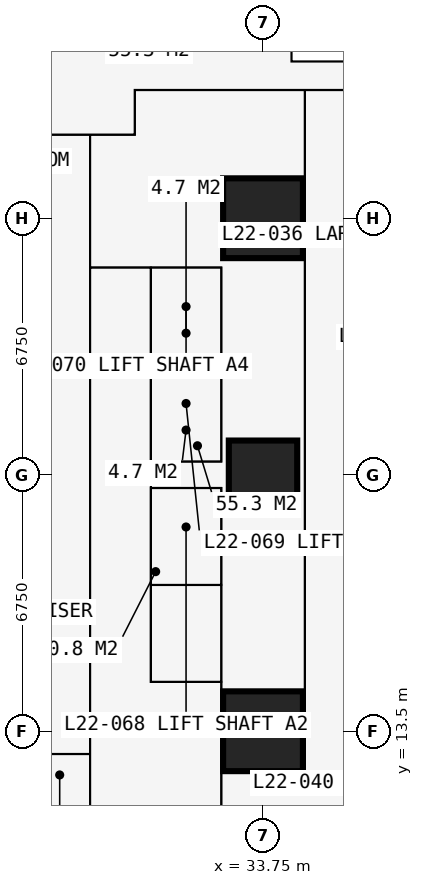
"""IFC4 building model, lengths in metres.
Left out: names, types, materials, properties, quantities, classifications, styles, units other than length and angle.
Written with IfcOpenShell. Run it as: python <this file> out.ifc"""

import sys

from ifc_helpers import new_model, si_unit, direction, frame, frame_2d, origin, origin_2d, place, context, subcontext, project, spatial, rectangle, extrude, element, fill, save


model = new_model("IFC4")
c1 = context("Model", 3, precision=1e-05, world=origin(), true_north=direction((0.0, 1.0)))
c2 = subcontext(c1, "Body", "Model", "MODEL_VIEW")
j1 = project(units=[si_unit("LENGTHUNIT", "METRE"), si_unit("PLANEANGLEUNIT", "RADIAN")], contexts=[c1])
p1 = place(None, origin())
s1 = spatial("IfcSite", under=j1, at=p1, CompositionType="ELEMENT")
p2 = place(p1, origin())
s2 = spatial("IfcBuilding", under=s1, at=p2, CompositionType="ELEMENT")
p3 = place(p2, frame((0.0, 0.0, 83.7)))
s3 = spatial("IfcBuildingStorey", under=s2, at=p3, CompositionType="ELEMENT", Elevation=83.7)
p4 = place(p3, frame((33.75, 13.5, 0.0), z_axis=(0.0, 0.0, 1.0), x_axis=(1.0, 0.0, 0.0)))
e1 = element("IfcColumn", 1, at=p4, inside=s3, PredefinedType="COLUMN", context=c2, shape_type="SweptSolid", body=[
    extrude(rectangle(XDim=2.1, YDim=2.1, at=origin_2d()), origin(), (0.0, 0.0, 1.0), 3.6),
])
p5 = place(p3, frame((33.75, 20.25, 0.0), z_axis=(0.0, 0.0, 1.0), x_axis=(1.0, 0.0, 0.0)))
e2 = element("IfcColumn", 2, at=p5, inside=s3, PredefinedType="COLUMN", context=c2, shape_type="SweptSolid", body=[
    extrude(rectangle(XDim=1.8, YDim=1.8, at=origin_2d()), origin(), (0.0, 0.0, 1.0), 3.6),
])
p6 = place(p3, frame((33.75, 27.0, 0.0), z_axis=(0.0, 0.0, 1.0), x_axis=(1.0, 0.0, 0.0)))
e3 = element("IfcColumn", 3, at=p6, inside=s3, PredefinedType="COLUMN", context=c2, shape_type="SweptSolid", body=[
    extrude(rectangle(XDim=2.1, YDim=2.1, at=origin_2d()), origin(), (0.0, 0.0, 1.0), 3.6),
])
p7 = place(p3, frame((37.875, 31.125, 0.0), z_axis=(0.0, 0.0, 1.0), x_axis=(-1.0, 0.0, 0.0)))
e4 = element("IfcWall", 4, at=p7, inside=s3, PredefinedType="SOLIDWALL", context=c2, shape_type="SweptSolid", body=[
    extrude(rectangle(XDim=3.375, YDim=0.3, at=frame_2d((1.688, 0.0))), origin(), (0.0, 0.0, 1.0), 3.375),
])
p8 = place(p7, frame((0.788, 0.0, 0.6)))
e5 = element("IfcOpeningElement", 5, at=p8, cuts=e4, PredefinedType="OPENING", context=c2, shape_type="SweptSolid", body=[
    extrude(rectangle(XDim=1.8, YDim=2.1, at=frame_2d((0.9, 1.05))), frame((0.0, 0.16, 0.0), z_axis=(0.0, -1.0, 0.0), x_axis=(1.0, 0.0, 0.0)), (0.0, 0.0, 1.0), 0.32),
])
p9 = place(p3, frame((34.5, 31.125, 0.0), z_axis=(0.0, 0.0, 1.0), x_axis=(0.0, 1.0, 0.0)))
e6 = element("IfcWall", 6, at=p9, inside=s3, PredefinedType="SOLIDWALL", context=c2, shape_type="SweptSolid", body=[
    extrude(rectangle(XDim=3.375, YDim=0.3, at=frame_2d((1.688, 0.0))), origin(), (0.0, 0.0, 1.0), 3.375),
])
p10 = place(p9, frame((0.343, 0.0, 0.9)))
e7 = element("IfcOpeningElement", 7, at=p10, cuts=e6, PredefinedType="OPENING", context=c2, shape_type="SweptSolid", body=[
    extrude(rectangle(XDim=1.2, YDim=1.8, at=frame_2d((0.6, 0.9))), frame((0.0, 0.16, 0.0), z_axis=(0.0, -1.0, 0.0), x_axis=(1.0, 0.0, 0.0)), (0.0, 0.0, 1.0), 0.32),
])
p11 = place(p3, frame((11.3, 29.2, 0.0), z_axis=(0.0, 0.0, 1.0), x_axis=(1.0, 0.0, 0.0)))
e8 = element("IfcWall", 8, at=p11, inside=s3, PredefinedType="PARTITIONING", context=c2, shape_type="SweptSolid", body=[
    extrude(rectangle(XDim=19.075, YDim=0.15, at=frame_2d((9.538, 0.0))), origin(), (0.0, 0.0, 1.0), 3.375),
])
p12 = place(p11, frame((5.825, 0.0, 0.0)))
e9 = element("IfcOpeningElement", 9, at=p12, cuts=e8, PredefinedType="OPENING", context=c2, shape_type="SweptSolid", body=[
    extrude(rectangle(XDim=0.95, YDim=2.2, at=frame_2d((0.475, 1.1))), frame((0.0, 0.085, 0.0), z_axis=(0.0, -1.0, 0.0), x_axis=(1.0, 0.0, 0.0)), (0.0, 0.0, 1.0), 0.17),
])
p13 = place(p11, frame((9.2, 0.0, 0.0)))
e10 = element("IfcOpeningElement", 10, at=p13, cuts=e8, PredefinedType="OPENING", context=c2, shape_type="SweptSolid", body=[
    extrude(rectangle(XDim=0.95, YDim=2.2, at=frame_2d((0.475, 1.1))), frame((0.0, 0.085, 0.0), z_axis=(0.0, -1.0, 0.0), x_axis=(1.0, 0.0, 0.0)), (0.0, 0.0, 1.0), 0.17),
])
p14 = place(p11, frame((0.6, 0.0, 0.0)))
e11 = element("IfcOpeningElement", 11, at=p14, cuts=e8, PredefinedType="OPENING", context=c2, shape_type="SweptSolid", body=[
    extrude(rectangle(XDim=1.0, YDim=2.2, at=frame_2d((0.5, 1.1))), frame((0.0, 0.085, 0.0), z_axis=(0.0, -1.0, 0.0), x_axis=(1.0, 0.0, 0.0)), (0.0, 0.0, 1.0), 0.17),
])
p15 = place(p3, frame((27.6, 12.9, 0.0), z_axis=(0.0, 0.0, 1.0), x_axis=(1.0, 0.0, 0.0)))
e12 = element("IfcWall", 12, at=p15, inside=s3, PredefinedType="PARTITIONING", context=c2, shape_type="SweptSolid", body=[
    extrude(rectangle(XDim=1.6, YDim=0.15, at=frame_2d((0.8, 0.0))), origin(), (0.0, 0.0, 1.0), 2.806),
])
p16 = place(p3, frame((29.2, 11.3, 0.0), z_axis=(0.0, 0.0, 1.0), x_axis=(0.0, 1.0, 0.0)))
e13 = element("IfcWall", 13, at=p16, inside=s3, PredefinedType="PARTITIONING", context=c2, shape_type="SweptSolid", body=[
    extrude(rectangle(XDim=17.9, YDim=0.2, at=frame_2d((8.95, 0.0))), origin(), (0.0, 0.0, 1.0), 3.375),
])
p17 = place(p16, frame((8.35, 0.0, 0.0)))
e14 = element("IfcOpeningElement", 14, at=p17, cuts=e13, PredefinedType="OPENING", context=c2, shape_type="SweptSolid", body=[
    extrude(rectangle(XDim=1.2, YDim=2.2, at=frame_2d((0.6, 1.1))), frame((0.0, 0.11, 0.0), z_axis=(0.0, -1.0, 0.0), x_axis=(1.0, 0.0, 0.0)), (0.0, 0.0, 1.0), 0.22),
])
p18 = place(p3, frame((29.2, 25.7, 0.0), z_axis=(0.0, 0.0, 1.0), x_axis=(1.0, 0.0, 0.0)))
e15 = element("IfcWall", 15, at=p18, inside=s3, PredefinedType="SHEAR", context=c2, shape_type="SweptSolid", body=[
    extrude(rectangle(XDim=3.45, YDim=0.1, at=frame_2d((1.725, 0.0))), origin(), (0.0, 0.0, 1.0), 3.375),
])
p19 = place(p3, frame((30.375, 29.2, 0.0), z_axis=(0.0, 0.0, 1.0), x_axis=(0.0, 1.0, 0.0)))
e16 = element("IfcWall", 16, at=p19, inside=s3, PredefinedType="PARTITIONING", context=c2, shape_type="SweptSolid", body=[
    extrude(rectangle(XDim=1.175, YDim=0.15, at=frame_2d((0.587, 0.0))), origin(), (0.0, 0.0, 1.0), 3.375),
])
p20 = place(p3, frame((30.375, 30.375, 0.0), z_axis=(0.0, 0.0, 1.0), x_axis=(1.0, 0.0, 0.0)))
e17 = element("IfcWall", 17, at=p20, inside=s3, PredefinedType="PARTITIONING", context=c2, shape_type="SweptSolid", body=[
    extrude(rectangle(XDim=7.35, YDim=0.15, at=frame_2d((3.675, 0.0))), origin(), (0.0, 0.0, 1.0), 2.877),
])
p21 = place(p20, frame((5.125, 0.0, 0.0)))
e18 = element("IfcOpeningElement", 18, at=p21, cuts=e17, PredefinedType="OPENING", context=c2, shape_type="SweptSolid", body=[
    extrude(rectangle(XDim=1.0, YDim=2.2, at=frame_2d((0.5, 1.1))), frame((0.0, 0.085, 0.0), z_axis=(0.0, -1.0, 0.0), x_axis=(1.0, 0.0, 0.0)), (0.0, 0.0, 1.0), 0.17),
])
p22 = place(p3, frame((30.8, 14.8, 0.0), z_axis=(0.0, 0.0, 1.0), x_axis=(0.0, 1.0, 0.0)))
e19 = element("IfcWall", 19, at=p22, inside=s3, PredefinedType="PARTITIONING", context=c2, shape_type="SweptSolid", body=[
    extrude(rectangle(XDim=10.9, YDim=0.15, at=frame_2d((5.45, 0.0))), origin(), (0.0, 0.0, 1.0), 3.375),
])
p23 = place(p22, frame((0.75, 0.0, 0.0)))
e20 = element("IfcOpeningElement", 20, at=p23, cuts=e19, PredefinedType="OPENING", context=c2, shape_type="SweptSolid", body=[
    extrude(rectangle(XDim=1.1, YDim=2.2, at=frame_2d((0.55, 1.1))), frame((0.0, 0.085, 0.0), z_axis=(0.0, -1.0, 0.0), x_axis=(1.0, 0.0, 0.0)), (0.0, 0.0, 1.0), 0.17),
])
p24 = place(p22, frame((3.25, 0.0, 0.0)))
e21 = element("IfcOpeningElement", 21, at=p24, cuts=e19, PredefinedType="OPENING", context=c2, shape_type="SweptSolid", body=[
    extrude(rectangle(XDim=1.1, YDim=2.2, at=frame_2d((0.55, 1.1))), frame((0.0, 0.085, 0.0), z_axis=(0.0, -1.0, 0.0), x_axis=(1.0, 0.0, 0.0)), (0.0, 0.0, 1.0), 0.17),
])
p25 = place(p22, frame((6.5, 0.0, 0.0)))
e22 = element("IfcOpeningElement", 22, at=p25, cuts=e19, PredefinedType="OPENING", context=c2, shape_type="SweptSolid", body=[
    extrude(rectangle(XDim=1.1, YDim=2.2, at=frame_2d((0.55, 1.1))), frame((0.0, 0.085, 0.0), z_axis=(0.0, -1.0, 0.0), x_axis=(1.0, 0.0, 0.0)), (0.0, 0.0, 1.0), 0.17),
])
p26 = place(p22, frame((9.05, 0.0, 0.0)))
e23 = element("IfcOpeningElement", 23, at=p26, cuts=e19, PredefinedType="OPENING", context=c2, shape_type="SweptSolid", body=[
    extrude(rectangle(XDim=1.1, YDim=2.2, at=frame_2d((0.55, 1.1))), frame((0.0, 0.085, 0.0), z_axis=(0.0, -1.0, 0.0), x_axis=(1.0, 0.0, 0.0)), (0.0, 0.0, 1.0), 0.17),
])
for number, where, z_axis, x_axis in (
    (24, (30.8, 14.8, 0.0), (0.0, 0.0, 1.0), (1.0, 0.0, 0.0)),
    (25, (30.8, 17.35, 0.0), (0.0, 0.0, 1.0), (1.0, 0.0, 0.0)),
    (26, (30.8, 19.9, 0.0), (0.0, 0.0, 1.0), (1.0, 0.0, 0.0)),
    (27, (30.8, 20.6, 0.0), (0.0, 0.0, 1.0), (1.0, 0.0, 0.0)),
    (28, (30.8, 23.15, 0.0), (0.0, 0.0, 1.0), (1.0, 0.0, 0.0)),
):
    element("IfcWall", number, at=place(p3, frame(where, z_axis=z_axis, x_axis=x_axis)), inside=s3, PredefinedType="SHEAR", context=c2, shape_type="SweptSolid", body=[
        extrude(rectangle(XDim=1.85, YDim=0.1, at=frame_2d((0.925, 0.0))), origin(), (0.0, 0.0, 1.0), 3.375),
    ])
p27 = place(p3, frame((32.65, 10.6, 0.0), z_axis=(0.0, 0.0, 1.0), x_axis=(0.0, 1.0, 0.0)))
e29 = element("IfcWall", 29, at=p27, inside=s3, PredefinedType="SHEAR", context=c2, shape_type="SweptSolid", body=[
    extrude(rectangle(XDim=9.3, YDim=0.1, at=frame_2d((4.65, 0.0))), origin(), (0.0, 0.0, 1.0), 3.375),
])
p28 = place(p27, frame((0.5, 0.0, 0.0)))
e30 = element("IfcOpeningElement", 30, at=p28, cuts=e29, PredefinedType="OPENING", context=c2, shape_type="SweptSolid", body=[
    extrude(rectangle(XDim=1.0, YDim=2.2, at=frame_2d((0.5, 1.1))), frame((0.0, 0.06, 0.0), z_axis=(0.0, -1.0, 0.0), x_axis=(1.0, 0.0, 0.0)), (0.0, 0.0, 1.0), 0.12),
])
p29 = place(p3, frame((32.65, 12.55, 0.0), z_axis=(0.0, 0.0, 1.0), x_axis=(1.0, 0.0, 0.0)))
e31 = element("IfcWall", 31, at=p29, inside=s3, PredefinedType="PARTITIONING", context=c2, shape_type="SweptSolid", body=[
    extrude(rectangle(XDim=2.2, YDim=0.15, at=frame_2d((1.1, 0.0))), origin(), (0.0, 0.0, 1.0), 3.375),
])
p30 = place(p3, frame((32.65, 20.6, 0.0), z_axis=(0.0, 0.0, 1.0), x_axis=(0.0, 1.0, 0.0)))
e32 = element("IfcWall", 32, at=p30, inside=s3, PredefinedType="PARTITIONING", context=c2, shape_type="SweptSolid", body=[
    extrude(rectangle(XDim=5.1, YDim=0.15, at=frame_2d((2.55, 0.0))), origin(), (0.0, 0.0, 1.0), 3.375),
])
p31 = place(p3, frame((34.85, 12.55, 0.0), z_axis=(0.0, 0.0, 1.0), x_axis=(0.0, 1.0, 0.0)))
e33 = element("IfcWall", 33, at=p31, inside=s3, PredefinedType="PARTITIONING", context=c2, shape_type="SweptSolid", body=[
    extrude(rectangle(XDim=17.825, YDim=0.15, at=frame_2d((8.913, 0.0))), origin(), (0.0, 0.0, 1.0), 3.375),
])
p32 = place(p31, frame((8.6, 0.0, 0.0)))
e34 = element("IfcOpeningElement", 34, at=p32, cuts=e33, PredefinedType="OPENING", context=c2, shape_type="SweptSolid", body=[
    extrude(rectangle(XDim=0.95, YDim=2.2, at=frame_2d((0.475, 1.1))), frame((0.0, 0.085, 0.0), z_axis=(0.0, -1.0, 0.0), x_axis=(1.0, 0.0, 0.0)), (0.0, 0.0, 1.0), 0.17),
])
p33 = place(p8, origin())
e35 = element("IfcWindow", 35, at=p33, inside=s3, PartitioningType="SINGLE_PANEL", PredefinedType="WINDOW", context=c2, shape_type="SweptSolid", body=[
    extrude(rectangle(XDim=1.8, YDim=2.1, at=frame_2d((0.9, 1.05))), frame((0.0, 0.03, 0.0), z_axis=(0.0, -1.0, 0.0), x_axis=(1.0, 0.0, 0.0)), (0.0, 0.0, 1.0), 0.06),
])
fill(e5, e35)
p34 = place(p28, origin())
e36 = element("IfcDoor", 36, at=p34, inside=s3, OperationType="SINGLE_SWING_LEFT", PredefinedType="DOOR", context=c2, shape_type="SweptSolid", body=[
    extrude(rectangle(XDim=1.0, YDim=2.2, at=frame_2d((0.5, 1.1))), frame((0.0, 0.025, 0.0), z_axis=(0.0, -1.0, 0.0), x_axis=(1.0, 0.0, 0.0)), (0.0, 0.0, 1.0), 0.05),
])
fill(e30, e36)
p35 = place(p32, origin())
e37 = element("IfcDoor", 37, at=p35, inside=s3, OperationType="SINGLE_SWING_LEFT", PredefinedType="DOOR", context=c2, shape_type="SweptSolid", body=[
    extrude(rectangle(XDim=0.95, YDim=2.2, at=frame_2d((0.475, 1.1))), frame((0.0, 0.025, 0.0), z_axis=(0.0, -1.0, 0.0), x_axis=(1.0, 0.0, 0.0)), (0.0, 0.0, 1.0), 0.05),
])
fill(e34, e37)
p36 = place(p21, origin())
e38 = element("IfcDoor", 38, at=p36, inside=s3, OperationType="SINGLE_SWING_LEFT", PredefinedType="DOOR", context=c2, shape_type="SweptSolid", body=[
    extrude(rectangle(XDim=1.0, YDim=2.2, at=frame_2d((0.5, 1.1))), frame((0.0, 0.025, 0.0), z_axis=(0.0, -1.0, 0.0), x_axis=(1.0, 0.0, 0.0)), (0.0, 0.0, 1.0), 0.05),
])
fill(e18, e38)
p37 = place(p23, origin())
e39 = element("IfcDoor", 39, at=p37, inside=s3, OperationType="DOUBLE_DOOR_SLIDING", PredefinedType="DOOR", context=c2, shape_type="SweptSolid", body=[
    extrude(rectangle(XDim=1.1, YDim=2.2, at=frame_2d((0.55, 1.1))), frame((0.0, 0.025, 0.0), z_axis=(0.0, -1.0, 0.0), x_axis=(1.0, 0.0, 0.0)), (0.0, 0.0, 1.0), 0.05),
])
fill(e20, e39)
p38 = place(p24, origin())
e40 = element("IfcDoor", 40, at=p38, inside=s3, OperationType="DOUBLE_DOOR_SLIDING", PredefinedType="DOOR", context=c2, shape_type="SweptSolid", body=[
    extrude(rectangle(XDim=1.1, YDim=2.2, at=frame_2d((0.55, 1.1))), frame((0.0, 0.025, 0.0), z_axis=(0.0, -1.0, 0.0), x_axis=(1.0, 0.0, 0.0)), (0.0, 0.0, 1.0), 0.05),
])
fill(e21, e40)
p39 = place(p25, origin())
e41 = element("IfcDoor", 41, at=p39, inside=s3, OperationType="DOUBLE_DOOR_SLIDING", PredefinedType="DOOR", context=c2, shape_type="SweptSolid", body=[
    extrude(rectangle(XDim=1.1, YDim=2.2, at=frame_2d((0.55, 1.1))), frame((0.0, 0.025, 0.0), z_axis=(0.0, -1.0, 0.0), x_axis=(1.0, 0.0, 0.0)), (0.0, 0.0, 1.0), 0.05),
])
fill(e22, e41)
p40 = place(p26, origin())
e42 = element("IfcDoor", 42, at=p40, inside=s3, OperationType="DOUBLE_DOOR_SLIDING", PredefinedType="DOOR", context=c2, shape_type="SweptSolid", body=[
    extrude(rectangle(XDim=1.1, YDim=2.2, at=frame_2d((0.55, 1.1))), frame((0.0, 0.025, 0.0), z_axis=(0.0, -1.0, 0.0), x_axis=(1.0, 0.0, 0.0)), (0.0, 0.0, 1.0), 0.05),
])
fill(e23, e42)
p41 = place(p17, origin())
e43 = element("IfcDoor", 43, at=p41, inside=s3, OperationType="DOUBLE_DOOR_SINGLE_SWING", PredefinedType="DOOR", context=c2, shape_type="SweptSolid", body=[
    extrude(rectangle(XDim=1.2, YDim=2.2, at=frame_2d((0.6, 1.1))), frame((0.0, 0.025, 0.0), z_axis=(0.0, -1.0, 0.0), x_axis=(1.0, 0.0, 0.0)), (0.0, 0.0, 1.0), 0.05),
])
fill(e14, e43)
save(model, sys.argv[1])
